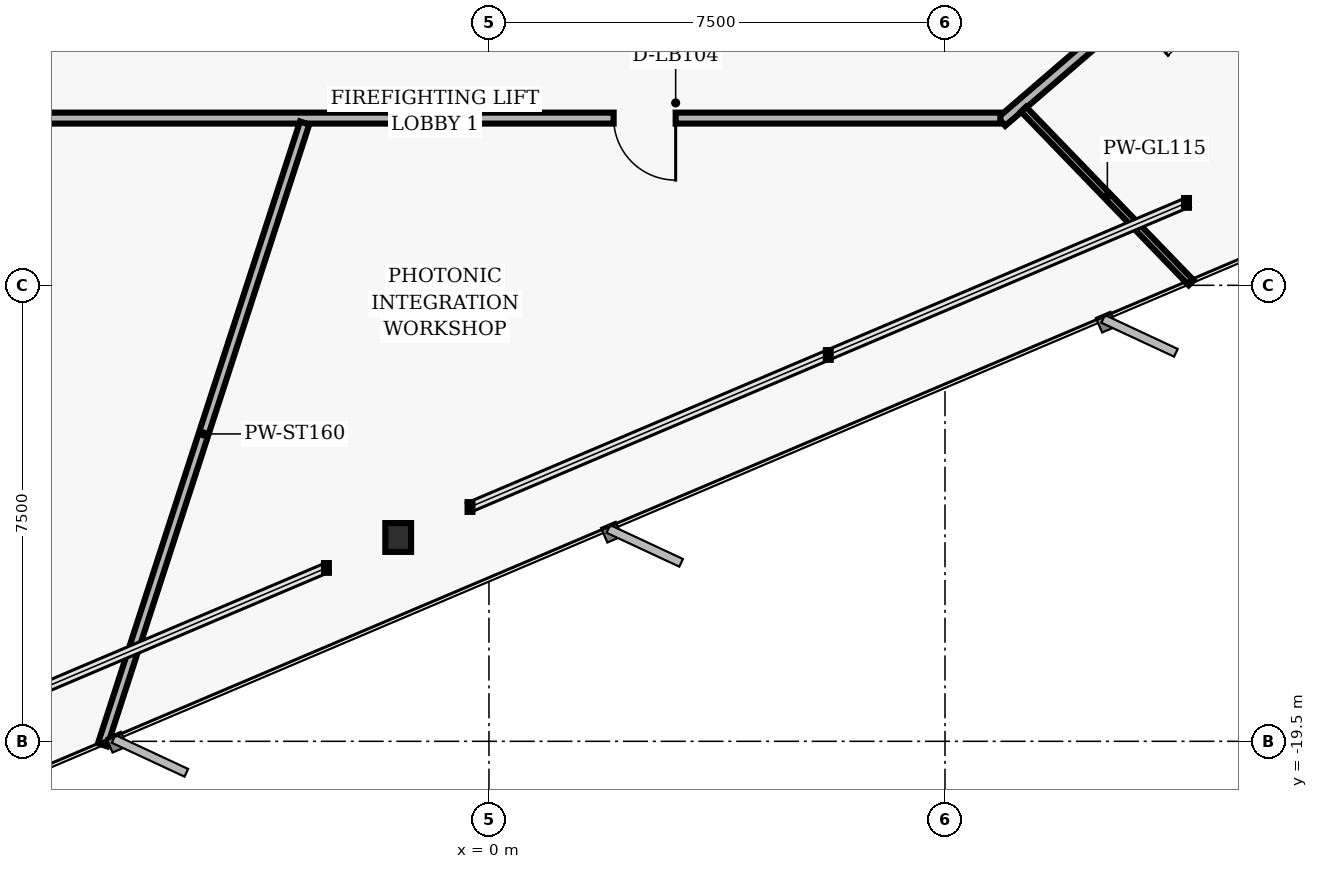
"""IFC4 building model, lengths in metres.
Left out: names, types, materials, properties, quantities, classifications, styles, units other than length and angle.
Written with IfcOpenShell. Run it as: python <this file> out.ifc"""

import sys

from ifc_helpers import new_model, si_unit, direction, frame, frame_2d, origin, origin_2d, place, context, subcontext, project, spatial, rectangle, i_section, extrude, element, fill, save


model = new_model("IFC4")
c1 = context("Model", 3, precision=1e-05, world=origin(), true_north=direction((0.0, 1.0)))
c2 = subcontext(c1, "Body", "Model", "MODEL_VIEW")
j1 = project(units=[si_unit("LENGTHUNIT", "METRE"), si_unit("PLANEANGLEUNIT", "RADIAN")], contexts=[c1])
p1 = place(None, origin())
s1 = spatial("IfcSite", under=j1, at=p1, CompositionType="ELEMENT")
p2 = place(p1, origin())
s2 = spatial("IfcBuilding", under=s1, at=p2, CompositionType="ELEMENT")
p3 = place(p2, frame((0.0, 0.0, 49.6)))
s3 = spatial("IfcBuildingStorey", under=s2, at=p3, CompositionType="ELEMENT", Elevation=49.6)
p4 = place(p3, frame((-1.493, -16.148, 0.0), z_axis=(0.0, 0.0, 1.0), x_axis=(1.0, 0.0, 0.0)))
e1 = element("IfcColumn", 1, at=p4, inside=s3, PredefinedType="COLUMN", context=c2, shape_type="SweptSolid", body=[
    extrude(i_section(OverallWidth=0.424, OverallDepth=0.474, WebThickness=0.048, FlangeThickness=0.077, FilletRadius=0.025, at=origin_2d()), origin(), (0.0, 0.0, 1.0), 3.36),
])
p5 = place(p3, frame((13.268, -5.141, 0.0), z_axis=(0.0, 0.0, 1.0), x_axis=(-0.757534501725, -0.65279512766, 0.0)))
e2 = element("IfcWall", 2, at=p5, inside=s3, PredefinedType="PARTITIONING", context=c2, shape_type="SweptSolid", body=[
    extrude(rectangle(XDim=6.385, YDim=0.18, at=frame_2d((3.192, 0.0))), origin(), (0.0, 0.0, 1.0), 3.073),
])
p6 = place(p5, frame((2.639, 0.0, 0.0)))
e3 = element("IfcOpeningElement", 3, at=p6, cuts=e2, PredefinedType="OPENING", context=c2, shape_type="SweptSolid", body=[
    extrude(rectangle(XDim=0.96, YDim=2.02, at=frame_2d((0.48, 1.01))), frame((0.0, 0.1, 0.0), z_axis=(0.0, -1.0, 0.0), x_axis=(1.0, 0.0, 0.0)), (0.0, 0.0, 1.0), 0.2),
])
p7 = place(p3, frame((8.41, -9.25, 0.0), z_axis=(0.0, 0.0, 1.0), x_axis=(-1.0, 0.0, 0.0)))
e4 = element("IfcWall", 4, at=p7, inside=s3, PredefinedType="PARTITIONING", context=c2, shape_type="SweptSolid", body=[
    extrude(rectangle(XDim=17.0, YDim=0.18, at=frame_2d((8.5, 0.0))), origin(), (0.0, 0.0, 1.0), 2.587),
])
p8 = place(p7, frame((5.34, 0.0, 0.0)))
e5 = element("IfcOpeningElement", 5, at=p8, cuts=e4, PredefinedType="OPENING", context=c2, shape_type="SweptSolid", body=[
    extrude(rectangle(XDim=1.02, YDim=2.02, at=frame_2d((0.51, 1.01))), frame((0.0, 0.1, 0.0), z_axis=(0.0, -1.0, 0.0), x_axis=(1.0, 0.0, 0.0)), (0.0, 0.0, 1.0), 0.2),
])
p9 = place(p3, frame((-3.031, -9.33, 0.0), z_axis=(0.0, 0.0, 1.0), x_axis=(-0.309020370084, -0.951055419454, 0.0)))
e6 = element("IfcWall", 6, at=p9, inside=s3, PredefinedType="PARTITIONING", context=c2, shape_type="SweptSolid", body=[
    extrude(rectangle(XDim=10.755, YDim=0.16, at=frame_2d((5.377, 0.0))), origin(), (0.0, 0.0, 1.0), 3.073),
])
p10 = place(p3, frame((8.792, -9.104, 0.0), z_axis=(0.0, 0.0, 1.0), x_axis=(0.694664773763, -0.719333616685, 0.0)))
e7 = element("IfcWall", 7, at=p10, inside=s3, PredefinedType="MOVABLE", context=c2, shape_type="SweptSolid", body=[
    extrude(rectangle(XDim=3.969, YDim=0.115, at=frame_2d((1.984, 0.0))), origin(), (0.0, 0.0, 1.0), 3.073),
])
p11 = place(p8, origin())
e8 = element("IfcDoor", 8, at=p11, inside=s3, OperationType="SINGLE_SWING_LEFT", PredefinedType="DOOR", context=c2, shape_type="SweptSolid", body=[
    extrude(rectangle(XDim=1.02, YDim=2.02, at=frame_2d((0.51, 1.01))), frame((0.0, 0.025, 0.0), z_axis=(0.0, -1.0, 0.0), x_axis=(1.0, 0.0, 0.0)), (0.0, 0.0, 1.0), 0.05),
])
fill(e5, e8)
save(model, sys.argv[1])
